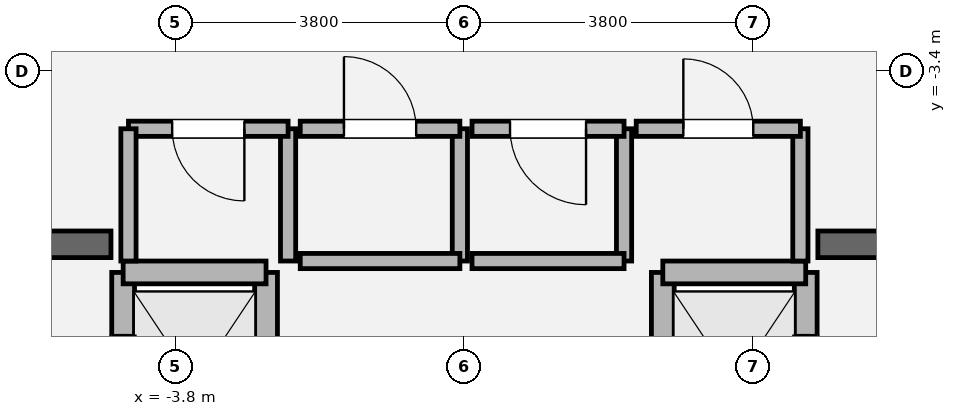
"""IFC4 building model, lengths in metres.
Left out: names, types, materials, properties, quantities, classifications, styles, units other than length and angle.
Written with IfcOpenShell. Run it as: python <this file> out.ifc"""

import sys

from ifc_helpers import new_model, si_unit, direction, frame, frame_2d, origin, place, context, subcontext, project, spatial, rectangle, extrude, element, fill, save


model = new_model("IFC4")
c1 = context("Model", 3, precision=1e-05, world=origin(), true_north=direction((0.0, 1.0)))
c2 = subcontext(c1, "Body", "Model", "MODEL_VIEW")
j1 = project(units=[si_unit("LENGTHUNIT", "METRE"), si_unit("PLANEANGLEUNIT", "RADIAN")], contexts=[c1])
p1 = place(None, origin())
s1 = spatial("IfcSite", under=j1, at=p1, CompositionType="ELEMENT")
p2 = place(p1, origin())
s2 = spatial("IfcBuilding", under=s1, at=p2, CompositionType="ELEMENT")
p3 = place(p2, frame((0.0, 0.0, 348.3)))
s3 = spatial("IfcBuildingStorey", under=s2, at=p3, CompositionType="ELEMENT", Elevation=348.3)
p4 = place(p3, frame((-9.975, -5.68, 0.0), z_axis=(0.0, 0.0, 1.0), x_axis=(1.0, 0.0, 0.0)))
e1 = element("IfcWall", 1, at=p4, inside=s3, PredefinedType="SOLIDWALL", context=c2, shape_type="SweptSolid", body=[
    extrude(rectangle(XDim=5.325, YDim=0.35, at=frame_2d((2.663, 0.0))), origin(), (0.0, 0.0, 1.0), 4.5),
])
p5 = place(p4, frame((1.435, 0.0, 0.0)))
e2 = element("IfcOpeningElement", 2, at=p5, cuts=e1, PredefinedType="OPENING", context=c2, shape_type="SweptSolid", body=[
    extrude(rectangle(XDim=1.18, YDim=2.2, at=frame_2d((0.59, 1.1))), frame((0.0, 0.185, 0.0), z_axis=(0.0, -1.0, 0.0), x_axis=(1.0, 0.0, 0.0)), (0.0, 0.0, 1.0), 0.37),
])
p6 = place(p3, frame((4.65, -5.68, 0.0), z_axis=(0.0, 0.0, 1.0), x_axis=(1.0, 0.0, 0.0)))
e3 = element("IfcWall", 3, at=p6, inside=s3, PredefinedType="SOLIDWALL", context=c2, shape_type="SweptSolid", body=[
    extrude(rectangle(XDim=5.325, YDim=0.35, at=frame_2d((2.663, 0.0))), origin(), (0.0, 0.0, 1.0), 4.5),
])
p7 = place(p6, frame((2.71, 0.0, 0.0)))
e4 = element("IfcOpeningElement", 4, at=p7, cuts=e3, PredefinedType="OPENING", context=c2, shape_type="SweptSolid", body=[
    extrude(rectangle(XDim=1.18, YDim=2.2, at=frame_2d((0.59, 1.1))), frame((0.0, 0.185, 0.0), z_axis=(0.0, -1.0, 0.0), x_axis=(1.0, 0.0, 0.0)), (0.0, 0.0, 1.0), 0.37),
])
p8 = place(p3, frame((-4.49, -8.82, 0.0), z_axis=(0.0, 0.0, 1.0), x_axis=(0.0, 1.0, 0.0)))
e5 = element("IfcWall", 5, at=p8, inside=s3, PredefinedType="SOLIDWALL", context=c2, shape_type="SweptSolid", body=[
    extrude(rectangle(XDim=2.77, YDim=0.3, at=frame_2d((1.385, 0.0))), origin(), (0.0, 0.0, 1.0), 4.22),
])
p9 = place(p8, frame((0.825, 0.0, 0.0)))
e6 = element("IfcOpeningElement", 6, at=p9, cuts=e5, PredefinedType="OPENING", context=c2, shape_type="SweptSolid", body=[
    extrude(rectangle(XDim=1.12, YDim=2.25, at=frame_2d((0.56, 1.125))), frame((0.0, 0.16, 0.0), z_axis=(0.0, -1.0, 0.0), x_axis=(1.0, 0.0, 0.0)), (0.0, 0.0, 1.0), 0.32),
])
p10 = place(p3, frame((-2.61, -8.82, 0.0), z_axis=(0.0, 0.0, 1.0), x_axis=(0.0, 1.0, 0.0)))
e7 = element("IfcWall", 7, at=p10, inside=s3, PredefinedType="SOLIDWALL", context=c2, shape_type="SweptSolid", body=[
    extrude(rectangle(XDim=2.77, YDim=0.3, at=frame_2d((1.385, 0.0))), origin(), (0.0, 0.0, 1.0), 4.22),
])
p11 = place(p3, frame((-4.49, -6.05, 0.0), z_axis=(0.0, 0.0, 1.0), x_axis=(1.0, 0.0, 0.0)))
e8 = element("IfcWall", 8, at=p11, inside=s3, PredefinedType="SOLIDWALL", context=c2, shape_type="SweptSolid", body=[
    extrude(rectangle(XDim=1.88, YDim=0.3, at=frame_2d((0.94, 0.0))), origin(), (0.0, 0.0, 1.0), 4.22),
])
p12 = place(p3, frame((4.49, -8.82, 0.0), z_axis=(0.0, 0.0, 1.0), x_axis=(0.0, 1.0, 0.0)))
e9 = element("IfcWall", 9, at=p12, inside=s3, PredefinedType="SOLIDWALL", context=c2, shape_type="SweptSolid", body=[
    extrude(rectangle(XDim=2.77, YDim=0.3, at=frame_2d((1.385, 0.0))), origin(), (0.0, 0.0, 1.0), 4.22),
])
p13 = place(p12, frame((0.825, 0.0, 0.0)))
e10 = element("IfcOpeningElement", 10, at=p13, cuts=e9, PredefinedType="OPENING", context=c2, shape_type="SweptSolid", body=[
    extrude(rectangle(XDim=1.12, YDim=2.25, at=frame_2d((0.56, 1.125))), frame((0.0, 0.16, 0.0), z_axis=(0.0, -1.0, 0.0), x_axis=(1.0, 0.0, 0.0)), (0.0, 0.0, 1.0), 0.32),
])
p14 = place(p3, frame((2.61, -8.82, 0.0), z_axis=(0.0, 0.0, 1.0), x_axis=(0.0, 1.0, 0.0)))
e11 = element("IfcWall", 11, at=p14, inside=s3, PredefinedType="SOLIDWALL", context=c2, shape_type="SweptSolid", body=[
    extrude(rectangle(XDim=2.77, YDim=0.3, at=frame_2d((1.385, 0.0))), origin(), (0.0, 0.0, 1.0), 4.22),
])
p15 = place(p3, frame((2.61, -6.05, 0.0), z_axis=(0.0, 0.0, 1.0), x_axis=(1.0, 0.0, 0.0)))
e12 = element("IfcWall", 12, at=p15, inside=s3, PredefinedType="SOLIDWALL", context=c2, shape_type="SweptSolid", body=[
    extrude(rectangle(XDim=1.88, YDim=0.3, at=frame_2d((0.94, 0.0))), origin(), (0.0, 0.0, 1.0), 4.22),
])
p16 = place(p3, frame((-2.32, -5.9, 0.0), z_axis=(0.0, 0.0, 1.0), x_axis=(0.0, 1.0, 0.0)))
e13 = element("IfcWall", 13, at=p16, inside=s3, PredefinedType="SOLIDWALL", context=c2, shape_type="SweptSolid", body=[
    extrude(rectangle(XDim=1.74, YDim=0.2, at=frame_2d((0.87, 0.0))), origin(), (0.0, 0.0, 1.0), 4.22),
])
p17 = place(p3, frame((-2.32, -4.16, 0.0), z_axis=(0.0, 0.0, 1.0), x_axis=(-1.0, 0.0, 0.0)))
e14 = element("IfcWall", 14, at=p17, inside=s3, PredefinedType="SOLIDWALL", context=c2, shape_type="SweptSolid", body=[
    extrude(rectangle(XDim=2.1, YDim=0.2, at=frame_2d((1.05, 0.0))), origin(), (0.0, 0.0, 1.0), 4.22),
])
p18 = place(p17, frame((0.575, 0.0, 0.0)))
e15 = element("IfcOpeningElement", 15, at=p18, cuts=e14, PredefinedType="OPENING", context=c2, shape_type="SweptSolid", body=[
    extrude(rectangle(XDim=0.95, YDim=2.15, at=frame_2d((0.475, 1.075))), frame((0.0, 0.11, 0.0), z_axis=(0.0, -1.0, 0.0), x_axis=(1.0, 0.0, 0.0)), (0.0, 0.0, 1.0), 0.22),
])
for number, where, z_axis, x_axis in (
    (16, (-4.42, -4.16, 0.0), (0.0, 0.0, 1.0), (0.0, -1.0, 0.0)),
    (17, (-0.06, -5.9, 0.0), (0.0, 0.0, 1.0), (0.0, 1.0, 0.0)),
):
    element("IfcWall", number, at=place(p3, frame(where, z_axis=z_axis, x_axis=x_axis)), inside=s3, PredefinedType="SOLIDWALL", context=c2, shape_type="SweptSolid", body=[
        extrude(rectangle(XDim=1.74, YDim=0.2, at=frame_2d((0.87, 0.0))), origin(), (0.0, 0.0, 1.0), 4.22),
    ])
p19 = place(p3, frame((-0.06, -4.16, 0.0), z_axis=(0.0, 0.0, 1.0), x_axis=(-1.0, 0.0, 0.0)))
e18 = element("IfcWall", 18, at=p19, inside=s3, PredefinedType="SOLIDWALL", context=c2, shape_type="SweptSolid", body=[
    extrude(rectangle(XDim=2.1, YDim=0.2, at=frame_2d((1.05, 0.0))), origin(), (0.0, 0.0, 1.0), 4.22),
])
p20 = place(p19, frame((0.575, 0.0, 0.0)))
e19 = element("IfcOpeningElement", 19, at=p20, cuts=e18, PredefinedType="OPENING", context=c2, shape_type="SweptSolid", body=[
    extrude(rectangle(XDim=0.95, YDim=2.15, at=frame_2d((0.475, 1.075))), frame((0.0, 0.11, 0.0), z_axis=(0.0, -1.0, 0.0), x_axis=(1.0, 0.0, 0.0)), (0.0, 0.0, 1.0), 0.22),
])
p21 = place(p3, frame((-2.16, -5.9, 0.0), z_axis=(0.0, 0.0, 1.0), x_axis=(1.0, 0.0, 0.0)))
e20 = element("IfcWall", 20, at=p21, inside=s3, PredefinedType="SOLIDWALL", context=c2, shape_type="SweptSolid", body=[
    extrude(rectangle(XDim=2.1, YDim=0.2, at=frame_2d((1.05, 0.0))), origin(), (0.0, 0.0, 1.0), 4.22),
])
p22 = place(p3, frame((2.1, -5.9, 0.0), z_axis=(0.0, 0.0, 1.0), x_axis=(0.0, 1.0, 0.0)))
e21 = element("IfcWall", 21, at=p22, inside=s3, PredefinedType="SOLIDWALL", context=c2, shape_type="SweptSolid", body=[
    extrude(rectangle(XDim=1.74, YDim=0.2, at=frame_2d((0.87, 0.0))), origin(), (0.0, 0.0, 1.0), 4.22),
])
p23 = place(p3, frame((2.1, -4.16, 0.0), z_axis=(0.0, 0.0, 1.0), x_axis=(-1.0, 0.0, 0.0)))
e22 = element("IfcWall", 22, at=p23, inside=s3, PredefinedType="SOLIDWALL", context=c2, shape_type="SweptSolid", body=[
    extrude(rectangle(XDim=2.0, YDim=0.2, at=frame_2d((1.0, 0.0))), origin(), (0.0, 0.0, 1.0), 4.22),
])
p24 = place(p23, frame((0.5, 0.0, 0.0)))
e23 = element("IfcOpeningElement", 23, at=p24, cuts=e22, PredefinedType="OPENING", context=c2, shape_type="SweptSolid", body=[
    extrude(rectangle(XDim=1.0, YDim=2.15, at=frame_2d((0.5, 1.075))), frame((0.0, 0.11, 0.0), z_axis=(0.0, -1.0, 0.0), x_axis=(1.0, 0.0, 0.0)), (0.0, 0.0, 1.0), 0.22),
])
p25 = place(p3, frame((0.1, -5.9, 0.0), z_axis=(0.0, 0.0, 1.0), x_axis=(1.0, 0.0, 0.0)))
e24 = element("IfcWall", 24, at=p25, inside=s3, PredefinedType="SOLIDWALL", context=c2, shape_type="SweptSolid", body=[
    extrude(rectangle(XDim=2.0, YDim=0.2, at=frame_2d((1.0, 0.0))), origin(), (0.0, 0.0, 1.0), 4.22),
])
p26 = place(p3, frame((4.42, -5.9, 0.0), z_axis=(0.0, 0.0, 1.0), x_axis=(0.0, 1.0, 0.0)))
e25 = element("IfcWall", 25, at=p26, inside=s3, PredefinedType="SOLIDWALL", context=c2, shape_type="SweptSolid", body=[
    extrude(rectangle(XDim=1.74, YDim=0.2, at=frame_2d((0.87, 0.0))), origin(), (0.0, 0.0, 1.0), 4.22),
])
p27 = place(p3, frame((4.42, -4.16, 0.0), z_axis=(0.0, 0.0, 1.0), x_axis=(-1.0, 0.0, 0.0)))
e26 = element("IfcWall", 26, at=p27, inside=s3, PredefinedType="SOLIDWALL", context=c2, shape_type="SweptSolid", body=[
    extrude(rectangle(XDim=2.16, YDim=0.2, at=frame_2d((1.08, 0.0))), origin(), (0.0, 0.0, 1.0), 4.22),
])
p28 = place(p27, frame((0.62, 0.0, 0.0)))
e27 = element("IfcOpeningElement", 27, at=p28, cuts=e26, PredefinedType="OPENING", context=c2, shape_type="SweptSolid", body=[
    extrude(rectangle(XDim=0.92, YDim=2.1, at=frame_2d((0.46, 1.05))), frame((0.0, 0.11, 0.0), z_axis=(0.0, -1.0, 0.0), x_axis=(1.0, 0.0, 0.0)), (0.0, 0.0, 1.0), 0.22),
])
p29 = place(p9, origin())
e28 = element("IfcDoor", 28, at=p29, inside=s3, OperationType="SLIDING_TO_LEFT", PredefinedType="DOOR", context=c2, shape_type="SweptSolid", body=[
    extrude(rectangle(XDim=1.12, YDim=2.25, at=frame_2d((0.56, 1.125))), frame((0.0, 0.025, 0.0), z_axis=(0.0, -1.0, 0.0), x_axis=(1.0, 0.0, 0.0)), (0.0, 0.0, 1.0), 0.05),
])
fill(e6, e28)
p30 = place(p13, origin())
e29 = element("IfcDoor", 29, at=p30, inside=s3, OperationType="SLIDING_TO_RIGHT", PredefinedType="DOOR", context=c2, shape_type="SweptSolid", body=[
    extrude(rectangle(XDim=1.12, YDim=2.25, at=frame_2d((0.56, 1.125))), frame((0.0, 0.025, 0.0), z_axis=(0.0, -1.0, 0.0), x_axis=(1.0, 0.0, 0.0)), (0.0, 0.0, 1.0), 0.05),
])
fill(e10, e29)
p31 = place(p18, origin())
e30 = element("IfcDoor", 30, at=p31, inside=s3, OperationType="SINGLE_SWING_LEFT", PredefinedType="DOOR", context=c2, shape_type="SweptSolid", body=[
    extrude(rectangle(XDim=0.95, YDim=2.15, at=frame_2d((0.475, 1.075))), frame((0.0, 0.025, 0.0), z_axis=(0.0, -1.0, 0.0), x_axis=(1.0, 0.0, 0.0)), (0.0, 0.0, 1.0), 0.05),
])
fill(e15, e30)
p32 = place(p20, origin())
e31 = element("IfcDoor", 31, at=p32, inside=s3, OperationType="SINGLE_SWING_RIGHT", PredefinedType="DOOR", context=c2, shape_type="SweptSolid", body=[
    extrude(rectangle(XDim=0.95, YDim=2.15, at=frame_2d((0.475, 1.075))), frame((0.0, 0.025, 0.0), z_axis=(0.0, -1.0, 0.0), x_axis=(1.0, 0.0, 0.0)), (0.0, 0.0, 1.0), 0.05),
])
fill(e19, e31)
p33 = place(p24, origin())
e32 = element("IfcDoor", 32, at=p33, inside=s3, OperationType="SINGLE_SWING_LEFT", PredefinedType="DOOR", context=c2, shape_type="SweptSolid", body=[
    extrude(rectangle(XDim=1.0, YDim=2.15, at=frame_2d((0.5, 1.075))), frame((0.0, 0.025, 0.0), z_axis=(0.0, -1.0, 0.0), x_axis=(1.0, 0.0, 0.0)), (0.0, 0.0, 1.0), 0.05),
])
fill(e23, e32)
p34 = place(p28, origin())
e33 = element("IfcDoor", 33, at=p34, inside=s3, OperationType="SINGLE_SWING_RIGHT", PredefinedType="DOOR", context=c2, shape_type="SweptSolid", body=[
    extrude(rectangle(XDim=0.92, YDim=2.1, at=frame_2d((0.46, 1.05))), frame((0.0, 0.025, 0.0), z_axis=(0.0, -1.0, 0.0), x_axis=(1.0, 0.0, 0.0)), (0.0, 0.0, 1.0), 0.05),
])
fill(e27, e33)
save(model, sys.argv[1])
